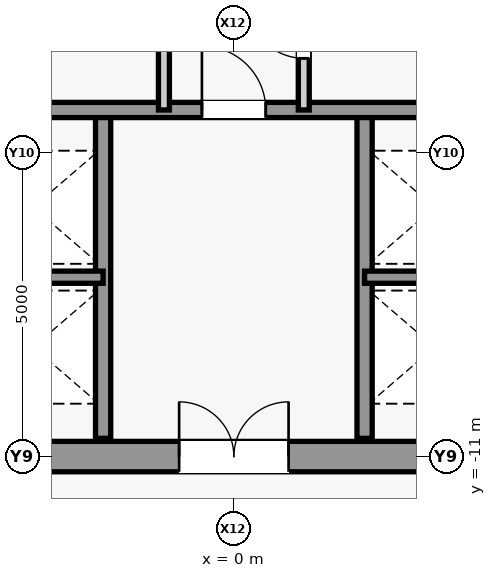
"""IFC4 building model, lengths in metres.
Left out: names, types, materials, properties, quantities, classifications, styles, units other than length and angle.
Written with IfcOpenShell. Run it as: python <this file> out.ifc"""

import sys

from ifc_helpers import new_model, si_unit, direction, frame, frame_2d, origin, place, context, subcontext, project, spatial, rectangle, extrude, source, transform, mapped, element, fill, save


model = new_model("IFC4")
c1 = context("Model", 3, precision=1e-05, world=origin(), true_north=direction((0.0, 1.0)))
c2 = subcontext(c1, "Body", "Model", "MODEL_VIEW")
j1 = project(units=[si_unit("LENGTHUNIT", "METRE"), si_unit("PLANEANGLEUNIT", "RADIAN")], contexts=[c1])
p1 = place(None, origin())
s1 = spatial("IfcSite", under=j1, at=p1, CompositionType="ELEMENT")
p2 = place(p1, origin())
s2 = spatial("IfcBuilding", under=s1, at=p2, CompositionType="ELEMENT")
p3 = place(p2, frame((0.0, 0.0, 149.9)))
s3 = spatial("IfcBuildingStorey", under=s2, at=p3, CompositionType="ELEMENT", Elevation=149.9)
m1 = source(origin(), c2, "Body", "SweptSolid", [
    extrude(rectangle(XDim=9.2, YDim=0.5, at=frame_2d((4.6, 0.0))), origin(), (0.0, 0.0, 1.0), 4.98),
])
p4 = place(p3, frame((-4.6, -11.0, 0.0), z_axis=(0.0, 0.0, 1.0), x_axis=(1.0, 0.0, 0.0)))
e1 = element("IfcWall", 1, at=p4, inside=s3, PredefinedType="SHEAR", context=c2, shape_type="MappedRepresentation", body=[
    mapped(m1, transform((0.0, 0.0, 0.0), scale=1.0)),
])
m2 = source(origin(), c2, "Body", "SweptSolid", [
    extrude(rectangle(XDim=1.8, YDim=2.25, at=frame_2d((0.9, 1.125))), frame((0.0, 0.26, 0.0), z_axis=(0.0, -1.0, 0.0), x_axis=(1.0, 0.0, 0.0)), (0.0, 0.0, 1.0), 0.52),
])
p5 = place(p4, frame((3.7, 0.0, 0.0)))
e2 = element("IfcOpeningElement", 2, at=p5, cuts=e1, PredefinedType="OPENING", context=c2, shape_type="MappedRepresentation", body=[
    mapped(m2, transform((0.0, 0.0, 0.0), scale=1.0)),
])
m3 = source(origin(), c2, "Body", "SweptSolid", [
    extrude(rectangle(XDim=5.4, YDim=0.25, at=frame_2d((2.7, 0.0))), origin(), (0.0, 0.0, 1.0), 4.98),
])
for number, where, z_axis, x_axis in (
    (3, (-2.15, -10.7, 0.0), (0.0, 0.0, 1.0), (0.0, 1.0, 0.0)),
    (4, (2.15, -10.7, 0.0), (0.0, 0.0, 1.0), (0.0, 1.0, 0.0)),
):
    element("IfcWall", number, at=place(p3, frame(where, z_axis=z_axis, x_axis=x_axis)), inside=s3, PredefinedType="SHEAR", context=c2, shape_type="MappedRepresentation", body=[
        mapped(m3, transform((0.0, 0.0, 0.0), scale=1.0)),
    ])
m4 = source(origin(), c2, "Body", "SweptSolid", [
    extrude(rectangle(XDim=2.45, YDim=0.2, at=frame_2d((1.225, 0.0))), origin(), (0.0, 0.0, 1.0), 4.98),
])
for number, where, z_axis, x_axis in (
    (5, (-4.6, -8.05, 0.0), (0.0, 0.0, 1.0), (1.0, 0.0, 0.0)),
    (6, (2.15, -8.05, 0.0), (0.0, 0.0, 1.0), (1.0, 0.0, 0.0)),
):
    element("IfcWall", number, at=place(p3, frame(where, z_axis=z_axis, x_axis=x_axis)), inside=s3, PredefinedType="SHEAR", context=c2, shape_type="MappedRepresentation", body=[
        mapped(m4, transform((0.0, 0.0, 0.0), scale=1.0)),
    ])
m5 = source(origin(), c2, "Body", "SweptSolid", [
    extrude(rectangle(XDim=9.2, YDim=0.25, at=frame_2d((4.6, 0.0))), origin(), (0.0, 0.0, 1.0), 4.98),
])
p6 = place(p3, frame((-4.6, -5.3, 0.0), z_axis=(0.0, 0.0, 1.0), x_axis=(1.0, 0.0, 0.0)))
e7 = element("IfcWall", 7, at=p6, inside=s3, PredefinedType="SHEAR", context=c2, shape_type="MappedRepresentation", body=[
    mapped(m5, transform((0.0, 0.0, 0.0), scale=1.0)),
])
m6 = source(origin(), c2, "Body", "SweptSolid", [
    extrude(rectangle(XDim=1.05, YDim=2.2, at=frame_2d((0.525, 1.1))), frame((0.0, 0.135, 0.0), z_axis=(0.0, -1.0, 0.0), x_axis=(1.0, 0.0, 0.0)), (0.0, 0.0, 1.0), 0.27),
])
p7 = place(p6, frame((4.075, 0.0, 0.0)))
e8 = element("IfcOpeningElement", 8, at=p7, cuts=e7, PredefinedType="OPENING", context=c2, shape_type="MappedRepresentation", body=[
    mapped(m6, transform((0.0, 0.0, 0.0), scale=1.0)),
])
m7 = source(origin(), c2, "Body", "SweptSolid", [
    extrude(rectangle(XDim=10.6, YDim=0.18, at=frame_2d((5.3, 0.0))), origin(), (0.0, 0.0, 1.0), 4.98),
])
p8 = place(p3, frame((-1.15, -5.3, 0.0), z_axis=(0.0, 0.0, 1.0), x_axis=(0.0, 1.0, 0.0)))
e9 = element("IfcWall", 9, at=p8, inside=s3, PredefinedType="PARTITIONING", context=c2, shape_type="MappedRepresentation", body=[
    mapped(m7, transform((0.0, 0.0, 0.0), scale=1.0)),
])
m8 = source(origin(), c2, "Body", "SweptSolid", [
    extrude(rectangle(XDim=0.9, YDim=2.15, at=frame_2d((0.45, 1.075))), frame((0.0, 0.1, 0.0), z_axis=(0.0, -1.0, 0.0), x_axis=(1.0, 0.0, 0.0)), (0.0, 0.0, 1.0), 0.2),
])
p9 = place(p8, frame((1.9, 0.0, 0.0)))
e10 = element("IfcOpeningElement", 10, at=p9, cuts=e9, PredefinedType="OPENING", context=c2, shape_type="MappedRepresentation", body=[
    mapped(m8, transform((0.0, 0.0, 0.0), scale=1.0)),
])
p10 = place(p8, frame((6.55, 0.0, 0.0)))
e11 = element("IfcOpeningElement", 11, at=p10, cuts=e9, PredefinedType="OPENING", context=c2, shape_type="MappedRepresentation", body=[
    mapped(m8, transform((0.0, 0.0, 0.0), scale=1.0)),
])
p11 = place(p8, frame((9.475, 0.0, 0.0)))
e12 = element("IfcOpeningElement", 12, at=p11, cuts=e9, PredefinedType="OPENING", context=c2, shape_type="MappedRepresentation", body=[
    mapped(m8, transform((0.0, 0.0, 0.0), scale=1.0)),
])
p12 = place(p3, frame((1.15, -5.3, 0.0), z_axis=(0.0, 0.0, 1.0), x_axis=(0.0, 1.0, 0.0)))
e13 = element("IfcWall", 13, at=p12, inside=s3, PredefinedType="PARTITIONING", context=c2, shape_type="MappedRepresentation", body=[
    mapped(m7, transform((0.0, 0.0, 0.0), scale=1.0)),
])
p13 = place(p12, frame((0.85, 0.0, 0.0)))
e14 = element("IfcOpeningElement", 14, at=p13, cuts=e13, PredefinedType="OPENING", context=c2, shape_type="MappedRepresentation", body=[
    mapped(m8, transform((0.0, 0.0, 0.0), scale=1.0)),
])
p14 = place(p12, frame((3.55, 0.0, 0.0)))
e15 = element("IfcOpeningElement", 15, at=p14, cuts=e13, PredefinedType="OPENING", context=c2, shape_type="MappedRepresentation", body=[
    mapped(m8, transform((0.0, 0.0, 0.0), scale=1.0)),
])
p15 = place(p12, frame((6.3, 0.0, 0.0)))
e16 = element("IfcOpeningElement", 16, at=p15, cuts=e13, PredefinedType="OPENING", context=c2, shape_type="MappedRepresentation", body=[
    mapped(m8, transform((0.0, 0.0, 0.0), scale=1.0)),
])
p16 = place(p12, frame((8.25, 0.0, 0.0)))
e17 = element("IfcOpeningElement", 17, at=p16, cuts=e13, PredefinedType="OPENING", context=c2, shape_type="MappedRepresentation", body=[
    mapped(m8, transform((0.0, 0.0, 0.0), scale=1.0)),
])
p17 = place(p12, frame((9.475, 0.0, 0.0)))
e18 = element("IfcOpeningElement", 18, at=p17, cuts=e13, PredefinedType="OPENING", context=c2, shape_type="MappedRepresentation", body=[
    mapped(m8, transform((0.0, 0.0, 0.0), scale=1.0)),
])
m9 = source(origin(), c2, "Body", "SweptSolid", [
    extrude(rectangle(XDim=1.05, YDim=2.2, at=frame_2d((0.525, 1.1))), frame((0.0, 0.025, 0.0), z_axis=(0.0, -1.0, 0.0), x_axis=(1.0, 0.0, 0.0)), (0.0, 0.0, 1.0), 0.05),
])
p18 = place(p7, origin())
e19 = element("IfcDoor", 19, at=p18, inside=s3, OperationType="SINGLE_SWING_LEFT", PredefinedType="DOOR", context=c2, shape_type="MappedRepresentation", body=[
    mapped(m9, transform((0.0, 0.0, 0.0), scale=1.0)),
])
fill(e8, e19)
m10 = source(origin(), c2, "Body", "SweptSolid", [
    extrude(rectangle(XDim=1.8, YDim=2.25, at=frame_2d((0.9, 1.125))), frame((0.0, 0.025, 0.0), z_axis=(0.0, -1.0, 0.0), x_axis=(1.0, 0.0, 0.0)), (0.0, 0.0, 1.0), 0.05),
])
p19 = place(p5, origin())
e20 = element("IfcDoor", 20, at=p19, inside=s3, OperationType="SINGLE_SWING_LEFT", PredefinedType="DOOR", context=c2, shape_type="MappedRepresentation", body=[
    mapped(m10, transform((0.0, 0.0, 0.0), scale=1.0)),
])
fill(e2, e20)
m11 = source(origin(), c2, "Body", "SweptSolid", [
    extrude(rectangle(XDim=0.9, YDim=2.15, at=frame_2d((0.45, 1.075))), frame((0.0, 0.025, 0.0), z_axis=(0.0, -1.0, 0.0), x_axis=(1.0, 0.0, 0.0)), (0.0, 0.0, 1.0), 0.05),
])
p20 = place(p13, origin())
e21 = element("IfcDoor", 21, at=p20, inside=s3, OperationType="SINGLE_SWING_RIGHT", PredefinedType="DOOR", context=c2, shape_type="MappedRepresentation", body=[
    mapped(m11, transform((0.0, 0.0, 0.0), scale=1.0)),
])
fill(e14, e21)
save(model, sys.argv[1])
